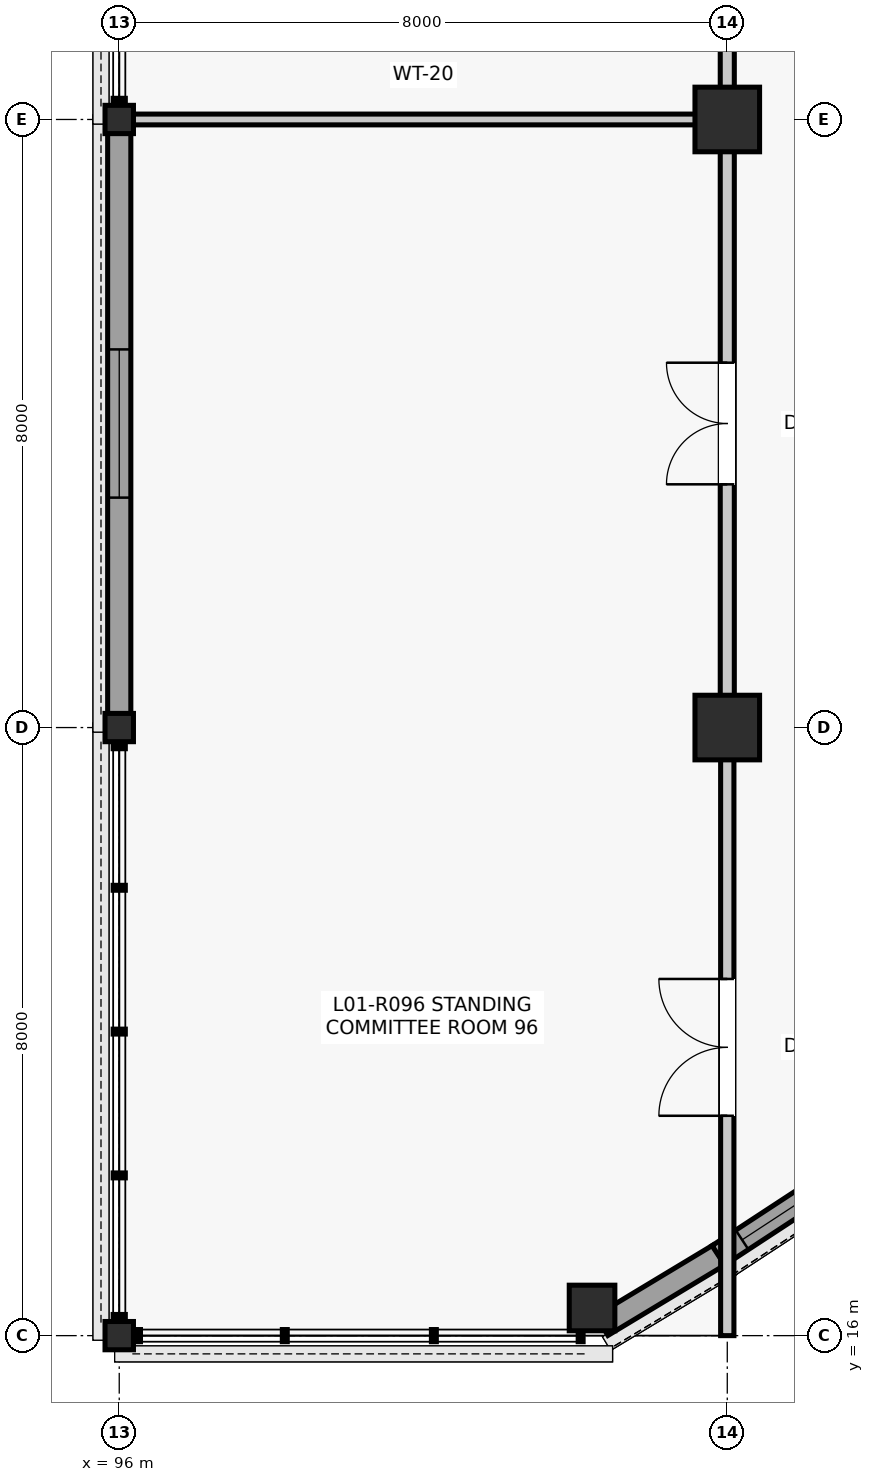
"""IFC4 building model, lengths in metres.
Left out: names, types, materials, properties, quantities, classifications, styles, units other than length and angle.
Written with IfcOpenShell. Run it as: python <this file> out.ifc"""

import sys

from ifc_helpers import new_model, si_unit, direction, frame, frame_2d, origin, origin_2d, place, context, subcontext, project, spatial, rectangle, i_section, extrude, element, fill, save


model = new_model("IFC4")
c1 = context("Model", 3, precision=1e-05, world=origin(), true_north=direction((0.0, 1.0)))
c2 = subcontext(c1, "Body", "Model", "MODEL_VIEW")
j1 = project(units=[si_unit("LENGTHUNIT", "METRE"), si_unit("PLANEANGLEUNIT", "RADIAN")], contexts=[c1])
p1 = place(None, origin())
s1 = spatial("IfcSite", under=j1, at=p1, CompositionType="ELEMENT")
p2 = place(p1, origin())
s2 = spatial("IfcBuilding", under=s1, at=p2, CompositionType="ELEMENT")
p3 = place(p2, frame((0.0, 0.0, 5.28)))
s3 = spatial("IfcBuildingStorey", under=s2, at=p3, CompositionType="ELEMENT", Elevation=5.28)
for number, where, z_axis, x_axis in (
    (1, (96.0, 16.0, 0.0), (0.0, 0.0, 1.0), (1.0, 0.0, 0.0)),
    (2, (96.0, 24.0, 0.0), (0.0, 0.0, 1.0), (1.0, 0.0, 0.0)),
    (3, (96.0, 32.0, 0.0), (0.0, 0.0, 1.0), (1.0, 0.0, 0.0)),
):
    element("IfcColumn", number, at=place(p3, frame(where, z_axis=z_axis, x_axis=x_axis)), inside=s3, PredefinedType="COLUMN", context=c2, shape_type="SweptSolid", body=[
        extrude(i_section(OverallWidth=0.374, OverallDepth=0.372, WebThickness=0.016, FlangeThickness=0.026, FilletRadius=0.015, at=origin_2d()), origin(), (0.0, 0.0, 1.0), 4.62),
    ])
for number, where, z_axis, x_axis in (
    (4, (104.0, 24.0, 0.0), (0.0, 0.0, 1.0), (1.0, 0.0, 0.0)),
    (5, (104.0, 32.0, 0.0), (0.0, 0.0, 1.0), (1.0, 0.0, 0.0)),
):
    element("IfcColumn", number, at=place(p3, frame(where, z_axis=z_axis, x_axis=x_axis)), inside=s3, PredefinedType="COLUMN", context=c2, shape_type="SweptSolid", body=[
        extrude(rectangle(XDim=0.85, YDim=0.85, at=origin_2d()), origin(), (0.0, 0.0, 1.0), 4.62),
    ])
p4 = place(p3, frame((102.221, 16.364, 0.0), z_axis=(0.0, 0.0, 1.0), x_axis=(1.0, 0.0, 0.0)))
e6 = element("IfcColumn", 6, at=p4, inside=s3, PredefinedType="COLUMN", context=c2, shape_type="SweptSolid", body=[
    extrude(rectangle(XDim=0.6, YDim=0.6, at=origin_2d()), origin(), (0.0, 0.0, 1.0), 4.62),
])
p5 = place(p3, frame((102.351, 16.133, 0.0), z_axis=(0.0, 0.0, 1.0), x_axis=(0.856543302071, 0.51607516088, 0.0)))
e7 = element("IfcWall", 7, at=p5, inside=s3, PredefinedType="SOLIDWALL", context=c2, shape_type="SweptSolid", body=[
    extrude(rectangle(XDim=1.795, YDim=0.305, at=frame_2d((0.897, 0.0))), origin(), (0.0, 0.0, 1.0), 4.335),
])
p6 = place(p3, frame((103.883, 17.056, 0.0), z_axis=(0.0, 0.0, 1.0), x_axis=(0.836686786408, 0.547681678944, 0.0)))
e8 = element("IfcWall", 8, at=p6, inside=s3, PredefinedType="SOLIDWALL", context=c2, shape_type="SweptSolid", body=[
    extrude(rectangle(XDim=1.795, YDim=0.305, at=frame_2d((0.897, 0.0))), origin(), (0.0, 0.0, 1.0), 4.335),
])
p7 = place(p6, frame((0.373, 0.0, 0.9)))
e9 = element("IfcOpeningElement", 9, at=p7, cuts=e8, PredefinedType="OPENING", context=c2, shape_type="SweptSolid", body=[
    extrude(rectangle(XDim=1.05, YDim=1.85, at=frame_2d((0.525, 0.925))), frame((0.0, 0.162, 0.0), z_axis=(0.0, -1.0, 0.0), x_axis=(1.0, 0.0, 0.0)), (0.0, 0.0, 1.0), 0.325),
])
p8 = place(p3, frame((96.0, 24.171, 0.0), z_axis=(0.0, 0.0, 1.0), x_axis=(0.0, 1.0, 0.0)))
e10 = element("IfcWall", 10, at=p8, inside=s3, PredefinedType="SOLIDWALL", context=c2, shape_type="SweptSolid", body=[
    extrude(rectangle(XDim=7.658, YDim=0.305, at=frame_2d((3.829, 0.0))), origin(), (0.0, 0.0, 1.0), 3.858),
])
p9 = place(p8, frame((2.854, 0.0, 0.9)))
e11 = element("IfcOpeningElement", 11, at=p9, cuts=e10, PredefinedType="OPENING", context=c2, shape_type="SweptSolid", body=[
    extrude(rectangle(XDim=1.95, YDim=2.45, at=frame_2d((0.975, 1.225))), frame((0.0, 0.162, 0.0), z_axis=(0.0, -1.0, 0.0), x_axis=(1.0, 0.0, 0.0)), (0.0, 0.0, 1.0), 0.325),
])
p10 = place(p3, frame((104.0, 16.0, 0.0), z_axis=(0.0, 0.0, 1.0), x_axis=(0.0, 1.0, 0.0)))
e12 = element("IfcWall", 12, at=p10, inside=s3, PredefinedType="PARTITIONING", context=c2, shape_type="SweptSolid", body=[
    extrude(rectangle(XDim=7.585, YDim=0.175, at=frame_2d((3.792, 0.0))), origin(), (0.0, 0.0, 1.0), 4.325),
])
p11 = place(p10, frame((2.893, 0.0, 0.0)))
e13 = element("IfcOpeningElement", 13, at=p11, cuts=e12, PredefinedType="OPENING", context=c2, shape_type="SweptSolid", body=[
    extrude(rectangle(XDim=1.8, YDim=2.35, at=frame_2d((0.9, 1.175))), frame((0.0, 0.097, 0.0), z_axis=(0.0, -1.0, 0.0), x_axis=(1.0, 0.0, 0.0)), (0.0, 0.0, 1.0), 0.195),
])
p12 = place(p3, frame((104.0, 24.415, 0.0), z_axis=(0.0, 0.0, 1.0), x_axis=(0.0, 1.0, 0.0)))
e14 = element("IfcWall", 14, at=p12, inside=s3, PredefinedType="PARTITIONING", context=c2, shape_type="SweptSolid", body=[
    extrude(rectangle(XDim=7.17, YDim=0.185, at=frame_2d((3.585, 0.0))), origin(), (0.0, 0.0, 1.0), 3.787),
])
p13 = place(p12, frame((2.785, 0.0, 0.0)))
e15 = element("IfcOpeningElement", 15, at=p13, cuts=e14, PredefinedType="OPENING", context=c2, shape_type="SweptSolid", body=[
    extrude(rectangle(XDim=1.6, YDim=2.25, at=frame_2d((0.8, 1.125))), frame((0.0, 0.103, 0.0), z_axis=(0.0, -1.0, 0.0), x_axis=(1.0, 0.0, 0.0)), (0.0, 0.0, 1.0), 0.205),
])
p14 = place(p3, frame((96.177, 32.0, 0.0), z_axis=(0.0, 0.0, 1.0), x_axis=(1.0, 0.0, 0.0)))
e16 = element("IfcWall", 16, at=p14, inside=s3, PredefinedType="PARTITIONING", context=c2, shape_type="SweptSolid", body=[
    extrude(rectangle(XDim=7.408, YDim=0.142, at=frame_2d((3.704, 0.0))), origin(), (0.0, 0.0, 1.0), 3.712),
])
p15 = place(p3, frame((104.0, 32.415, 0.0), z_axis=(0.0, 0.0, 1.0), x_axis=(0.0, 1.0, 0.0)))
e17 = element("IfcWall", 17, at=p15, inside=s3, PredefinedType="PARTITIONING", context=c2, shape_type="SweptSolid", body=[
    extrude(rectangle(XDim=7.17, YDim=0.185, at=frame_2d((3.585, 0.0))), origin(), (0.0, 0.0, 1.0), 3.857),
])
p16 = place(p15, frame((1.302, 0.0, 0.0)))
e18 = element("IfcOpeningElement", 18, at=p16, cuts=e17, PredefinedType="OPENING", context=c2, shape_type="SweptSolid", body=[
    extrude(rectangle(XDim=0.98, YDim=2.15, at=frame_2d((0.49, 1.075))), frame((0.0, 0.103, 0.0), z_axis=(0.0, -1.0, 0.0), x_axis=(1.0, 0.0, 0.0)), (0.0, 0.0, 1.0), 0.205),
])
p17 = place(p15, frame((5.246, 0.0, 0.0)))
e19 = element("IfcOpeningElement", 19, at=p17, cuts=e17, PredefinedType="OPENING", context=c2, shape_type="SweptSolid", body=[
    extrude(rectangle(XDim=0.98, YDim=2.15, at=frame_2d((0.49, 1.075))), frame((0.0, 0.103, 0.0), z_axis=(0.0, -1.0, 0.0), x_axis=(1.0, 0.0, 0.0)), (0.0, 0.0, 1.0), 0.205),
])
p18 = place(p7, origin())
e20 = element("IfcWindow", 20, at=p18, inside=s3, PartitioningType="SINGLE_PANEL", PredefinedType="WINDOW", context=c2, shape_type="SweptSolid", body=[
    extrude(rectangle(XDim=1.05, YDim=1.85, at=frame_2d((0.525, 0.925))), frame((0.0, 0.03, 0.0), z_axis=(0.0, -1.0, 0.0), x_axis=(1.0, 0.0, 0.0)), (0.0, 0.0, 1.0), 0.06),
])
fill(e9, e20)
p19 = place(p9, origin())
e21 = element("IfcWindow", 21, at=p19, inside=s3, PartitioningType="SINGLE_PANEL", PredefinedType="WINDOW", context=c2, shape_type="SweptSolid", body=[
    extrude(rectangle(XDim=1.95, YDim=2.45, at=frame_2d((0.975, 1.225))), frame((0.0, 0.03, 0.0), z_axis=(0.0, -1.0, 0.0), x_axis=(1.0, 0.0, 0.0)), (0.0, 0.0, 1.0), 0.06),
])
fill(e11, e21)
p20 = place(p11, origin())
e22 = element("IfcDoor", 22, at=p20, inside=s3, OperationType="DOUBLE_DOOR_SINGLE_SWING", PredefinedType="DOOR", context=c2, shape_type="SweptSolid", body=[
    extrude(rectangle(XDim=1.8, YDim=2.35, at=frame_2d((0.9, 1.175))), frame((0.0, 0.025, 0.0), z_axis=(0.0, -1.0, 0.0), x_axis=(1.0, 0.0, 0.0)), (0.0, 0.0, 1.0), 0.05),
])
fill(e13, e22)
p21 = place(p13, origin())
e23 = element("IfcDoor", 23, at=p21, inside=s3, OperationType="DOUBLE_DOOR_SINGLE_SWING", PredefinedType="DOOR", context=c2, shape_type="SweptSolid", body=[
    extrude(rectangle(XDim=1.6, YDim=2.25, at=frame_2d((0.8, 1.125))), frame((0.0, 0.025, 0.0), z_axis=(0.0, -1.0, 0.0), x_axis=(1.0, 0.0, 0.0)), (0.0, 0.0, 1.0), 0.05),
])
fill(e15, e23)
save(model, sys.argv[1])
